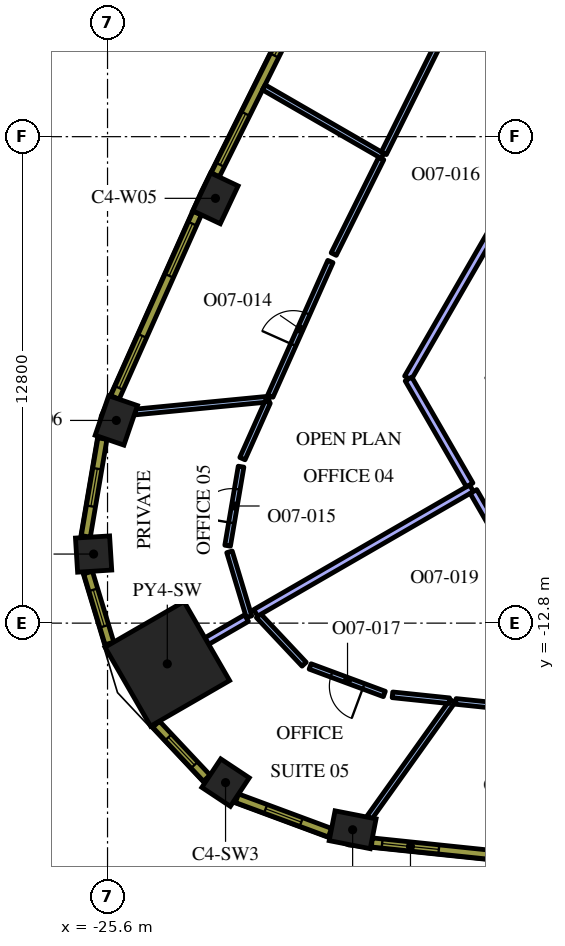
"""IFC4 building model, lengths in metres.
Left out: names, types, materials, properties, quantities, classifications, styles, units other than length and angle.
Written with IfcOpenShell. Run it as: python <this file> out.ifc"""

import sys

from ifc_helpers import new_model, si_unit, direction, frame, frame_2d, origin, origin_2d, place, context, subcontext, project, spatial, rectangle, extrude, element, fill, save


model = new_model("IFC4")
c1 = context("Model", 3, precision=1e-05, world=origin(), true_north=direction((0.0, 1.0)))
c2 = subcontext(c1, "Body", "Model", "MODEL_VIEW")
j1 = project(units=[si_unit("LENGTHUNIT", "METRE"), si_unit("PLANEANGLEUNIT", "RADIAN")], contexts=[c1])
p1 = place(None, origin())
s1 = spatial("IfcSite", under=j1, at=p1, CompositionType="ELEMENT")
p2 = place(p1, origin())
s2 = spatial("IfcBuilding", under=s1, at=p2, CompositionType="ELEMENT")
p3 = place(p2, frame((0.0, 0.0, 218.4)))
s3 = spatial("IfcBuildingStorey", under=s2, at=p3, CompositionType="ELEMENT", Elevation=218.4)
p4 = place(p3, frame((-24.027, -13.872, 0.0), z_axis=(0.0, 0.0, 1.0), x_axis=(-0.866025403784, -0.5, 0.0)))
e1 = element("IfcColumn", 1, at=p4, inside=s3, PredefinedType="COLUMN", context=c2, shape_type="SweptSolid", body=[
    extrude(rectangle(XDim=2.4, YDim=2.4, at=origin_2d()), origin(), (0.0, 0.0, 1.0), 4.2),
])
for number, where, z_axis, x_axis in (
    (2, (-19.15, -18.237, 0.0), (0.0, 0.0, 1.0), (0.981, -0.192, 0.0)),
    (3, (-22.76, -1.623, 0.0), (0.0, 0.0, 1.0), (-0.426, -0.905, 0.0)),
    (4, (-25.369, -7.466, 0.0), (0.0, 0.0, 1.0), (-0.324, -0.946, 0.0)),
):
    element("IfcColumn", number, at=place(p3, frame(where, z_axis=z_axis, x_axis=x_axis)), inside=s3, PredefinedType="COLUMN", context=c2, shape_type="SweptSolid", body=[
        extrude(rectangle(XDim=1.1, YDim=0.8, at=origin_2d()), origin(), (0.0, 0.0, 1.0), 4.2),
    ])
for number, where, z_axis, x_axis in (
    (5, (-25.967, -10.982, 0.0), (0.0, 0.0, 1.0), (0.062, -0.998, 0.0)),
    (6, (-22.494, -16.997, 0.0), (0.0, 0.0, 1.0), (0.833, -0.553, 0.0)),
):
    element("IfcColumn", number, at=place(p3, frame(where, z_axis=z_axis, x_axis=x_axis)), inside=s3, PredefinedType="COLUMN", context=c2, shape_type="SweptSolid", body=[
        extrude(rectangle(XDim=0.9, YDim=0.9, at=origin_2d()), origin(), (0.0, 0.0, 1.0), 4.2),
    ])
p5 = place(p3, frame((-18.363, -0.506, 0.0), z_axis=(0.0, 0.0, 1.0), x_axis=(-0.866048087663, 0.499960708312, 0.0)))
e7 = element("IfcWall", 7, at=p5, inside=s3, PredefinedType="PARTITIONING", context=c2, shape_type="SweptSolid", body=[
    extrude(rectangle(XDim=3.607, YDim=0.15, at=frame_2d((1.804, 0.0))), origin(), (0.0, 0.0, 1.0), 3.45),
])
p6 = place(p3, frame((-16.958, 2.321, 0.0), z_axis=(0.0, 0.0, 1.0), x_axis=(-0.445184199442, -0.895439014432, 0.0)))
e8 = element("IfcWall", 8, at=p6, inside=s3, PredefinedType="PARTITIONING", context=c2, shape_type="SweptSolid", body=[
    extrude(rectangle(XDim=3.082, YDim=0.15, at=frame_2d((1.541, 0.0))), origin(), (0.0, 0.0, 1.0), 3.45),
])
p7 = place(p3, frame((-21.351, -6.904, 0.0), z_axis=(0.0, 0.0, 1.0), x_axis=(-0.995356631468, -0.096255785242, 0.0)))
e9 = element("IfcWall", 9, at=p7, inside=s3, PredefinedType="PARTITIONING", context=c2, shape_type="SweptSolid", body=[
    extrude(rectangle(XDim=3.536, YDim=0.15, at=frame_2d((1.768, 0.0))), origin(), (0.0, 0.0, 1.0), 3.45),
])
p8 = place(p3, frame((-18.397, -0.573, 0.0), z_axis=(0.0, 0.0, 1.0), x_axis=(-0.445162501923, -0.89544980143, 0.0)))
e10 = element("IfcWall", 10, at=p8, inside=s3, PredefinedType="PARTITIONING", context=c2, shape_type="SweptSolid", body=[
    extrude(rectangle(XDim=2.811, YDim=0.15, at=frame_2d((1.405, 0.0))), origin(), (0.0, 0.0, 1.0), 3.45),
])
p9 = place(p3, frame((-21.316, -6.826, 0.0), z_axis=(0.0, 0.0, 1.0), x_axis=(0.407639588163, 0.913142905663, 0.0)))
e11 = element("IfcWall", 11, at=p9, inside=s3, PredefinedType="PARTITIONING", context=c2, shape_type="SweptSolid", body=[
    extrude(rectangle(XDim=3.877, YDim=0.15, at=frame_2d((1.938, 0.0))), origin(), (0.0, 0.0, 1.0), 3.45),
])
p10 = place(p9, frame((1.477, 0.0, 0.0)))
e12 = element("IfcOpeningElement", 12, at=p10, cuts=e11, PredefinedType="OPENING", context=c2, shape_type="SweptSolid", body=[
    extrude(rectangle(XDim=0.9, YDim=2.1, at=frame_2d((0.45, 1.05))), frame((0.0, 0.085, 0.0), z_axis=(0.0, -1.0, 0.0), x_axis=(1.0, 0.0, 0.0)), (0.0, 0.0, 1.0), 0.17),
])
p11 = place(p3, frame((-21.386, -6.983, 0.0), z_axis=(0.0, 0.0, 1.0), x_axis=(-0.407597309494, -0.91316177827, 0.0)))
e13 = element("IfcWall", 13, at=p11, inside=s3, PredefinedType="PARTITIONING", context=c2, shape_type="SweptSolid", body=[
    extrude(rectangle(XDim=1.63, YDim=0.15, at=frame_2d((0.815, 0.0))), origin(), (0.0, 0.0, 1.0), 3.45),
])
p12 = place(p3, frame((-22.44, -10.763, 0.0), z_axis=(0.0, 0.0, 1.0), x_axis=(0.167682096872, 0.985841120257, 0.0)))
e14 = element("IfcWall", 14, at=p12, inside=s3, PredefinedType="PARTITIONING", context=c2, shape_type="SweptSolid", body=[
    extrude(rectangle(XDim=2.11, YDim=0.15, at=frame_2d((1.055, 0.0))), origin(), (0.0, 0.0, 1.0), 3.45),
])
p13 = place(p12, frame((0.61, 0.0, 0.0)))
e15 = element("IfcOpeningElement", 15, at=p13, cuts=e14, PredefinedType="OPENING", context=c2, shape_type="SweptSolid", body=[
    extrude(rectangle(XDim=0.9, YDim=2.1, at=frame_2d((0.45, 1.05))), frame((0.0, 0.085, 0.0), z_axis=(0.0, -1.0, 0.0), x_axis=(1.0, 0.0, 0.0)), (0.0, 0.0, 1.0), 0.17),
])
p14 = place(p3, frame((-22.391, -10.924, 0.0), z_axis=(0.0, 0.0, 1.0), x_axis=(0.288642134652, -0.957437056993, 0.0)))
e16 = element("IfcWall", 16, at=p14, inside=s3, PredefinedType="PARTITIONING", context=c2, shape_type="SweptSolid", body=[
    extrude(rectangle(XDim=1.782, YDim=0.15, at=frame_2d((0.891, 0.0))), origin(), (0.0, 0.0, 1.0), 3.45),
])
p15 = place(p3, frame((-21.943, -12.669, 0.0), z_axis=(0.0, 0.0, 1.0), x_axis=(-0.866030586491, -0.499991023182, 0.0)))
e17 = element("IfcWall", 17, at=p15, inside=s3, PredefinedType="PARTITIONING", context=c2, shape_type="SweptSolid", body=[
    extrude(rectangle(XDim=1.207, YDim=0.2, at=frame_2d((0.603, 0.0))), origin(), (0.0, 0.0, 1.0), 3.45),
])
p16 = place(p3, frame((-16.021, -9.25, 0.0), z_axis=(0.0, 0.0, 1.0), x_axis=(-0.866021955858, -0.500005971936, 0.0)))
e18 = element("IfcWall", 18, at=p16, inside=s3, PredefinedType="PARTITIONING", context=c2, shape_type="SweptSolid", body=[
    extrude(rectangle(XDim=6.56, YDim=0.2, at=frame_2d((3.28, 0.0))), origin(), (0.0, 0.0, 1.0), 3.45),
])
p17 = place(p3, frame((-12.537, 2.585, 0.0), z_axis=(0.0, 0.0, 1.0), x_axis=(-0.500002393198, -0.866024022066, 0.0)))
e19 = element("IfcWall", 19, at=p17, inside=s3, PredefinedType="PARTITIONING", context=c2, shape_type="SweptSolid", body=[
    extrude(rectangle(XDim=10.317, YDim=0.2, at=frame_2d((5.159, 0.0))), origin(), (0.0, 0.0, 1.0), 3.45),
])
p18 = place(p17, frame((4.7, 0.0, 0.0)))
e20 = element("IfcOpeningElement", 20, at=p18, cuts=e19, PredefinedType="OPENING", context=c2, shape_type="SweptSolid", body=[
    extrude(rectangle(XDim=1.0, YDim=2.1, at=frame_2d((0.5, 1.05))), frame((0.0, 0.11, 0.0), z_axis=(0.0, -1.0, 0.0), x_axis=(1.0, 0.0, 0.0)), (0.0, 0.0, 1.0), 0.22),
])
p19 = place(p3, frame((-17.681, -6.376, 0.0), z_axis=(0.0, 0.0, 1.0), x_axis=(0.500022299258, -0.866012528919, 0.0)))
e21 = element("IfcWall", 21, at=p19, inside=s3, PredefinedType="PARTITIONING", context=c2, shape_type="SweptSolid", body=[
    extrude(rectangle(XDim=3.219, YDim=0.2, at=frame_2d((1.609, 0.0))), origin(), (0.0, 0.0, 1.0), 3.45),
])
p20 = place(p3, frame((-16.521, -14.851, 0.0), z_axis=(0.0, 0.0, 1.0), x_axis=(-0.58104805465, -0.813869251285, 0.0)))
e22 = element("IfcWall", 22, at=p20, inside=s3, PredefinedType="PARTITIONING", context=c2, shape_type="SweptSolid", body=[
    extrude(rectangle(XDim=3.766, YDim=0.15, at=frame_2d((1.883, 0.0))), origin(), (0.0, 0.0, 1.0), 3.45),
])
p21 = place(p3, frame((-21.628, -12.603, 0.0), z_axis=(0.0, 0.0, 1.0), x_axis=(0.684778496912, -0.728751267695, 0.0)))
e23 = element("IfcWall", 23, at=p21, inside=s3, PredefinedType="PARTITIONING", context=c2, shape_type="SweptSolid", body=[
    extrude(rectangle(XDim=1.754, YDim=0.15, at=frame_2d((0.877, 0.0))), origin(), (0.0, 0.0, 1.0), 3.45),
])
p22 = place(p3, frame((-18.316, -14.664, 0.0), z_axis=(0.0, 0.0, 1.0), x_axis=(-0.937594570401, 0.347730386297, 0.0)))
e24 = element("IfcWall", 24, at=p22, inside=s3, PredefinedType="PARTITIONING", context=c2, shape_type="SweptSolid", body=[
    extrude(rectangle(XDim=2.083, YDim=0.15, at=frame_2d((1.042, 0.0))), origin(), (0.0, 0.0, 1.0), 3.45),
])
p23 = place(p22, frame((0.583, 0.0, 0.0)))
e25 = element("IfcOpeningElement", 25, at=p23, cuts=e24, PredefinedType="OPENING", context=c2, shape_type="SweptSolid", body=[
    extrude(rectangle(XDim=0.9, YDim=2.1, at=frame_2d((0.45, 1.05))), frame((0.0, 0.085, 0.0), z_axis=(0.0, -1.0, 0.0), x_axis=(1.0, 0.0, 0.0)), (0.0, 0.0, 1.0), 0.17),
])
p24 = place(p3, frame((-18.103, -14.686, 0.0), z_axis=(0.0, 0.0, 1.0), x_axis=(0.994622241781, -0.103569281909, 0.0)))
e26 = element("IfcWall", 26, at=p24, inside=s3, PredefinedType="PARTITIONING", context=c2, shape_type="SweptSolid", body=[
    extrude(rectangle(XDim=1.504, YDim=0.15, at=frame_2d((0.752, 0.0))), origin(), (0.0, 0.0, 1.0), 3.45),
])
p25 = place(p3, frame((-12.823, -15.236, 0.0), z_axis=(0.0, 0.0, 1.0), x_axis=(-0.994621582944, 0.10357560882, 0.0)))
e27 = element("IfcWall", 27, at=p25, inside=s3, PredefinedType="PARTITIONING", context=c2, shape_type="SweptSolid", body=[
    extrude(rectangle(XDim=3.632, YDim=0.15, at=frame_2d((1.816, 0.0))), origin(), (0.0, 0.0, 1.0), 3.45),
])
p26 = place(p25, frame((1.332, 0.0, 0.0)))
e28 = element("IfcOpeningElement", 28, at=p26, cuts=e27, PredefinedType="OPENING", context=c2, shape_type="SweptSolid", body=[
    extrude(rectangle(XDim=0.9, YDim=2.1, at=frame_2d((0.45, 1.05))), frame((0.0, 0.085, 0.0), z_axis=(0.0, -1.0, 0.0), x_axis=(1.0, 0.0, 0.0)), (0.0, 0.0, 1.0), 0.17),
])
p27 = place(p3, frame((-15.971, -9.337, 0.0), z_axis=(0.0, 0.0, 1.0), x_axis=(0.500010870188, -0.866019127788, 0.0)))
e29 = element("IfcWall", 29, at=p27, inside=s3, PredefinedType="PARTITIONING", context=c2, shape_type="SweptSolid", body=[
    extrude(rectangle(XDim=3.249, YDim=0.2, at=frame_2d((1.624, 0.0))), origin(), (0.0, 0.0, 1.0), 3.45),
])
p28 = place(p27, frame((1.1, 0.0, 0.0)))
e30 = element("IfcOpeningElement", 30, at=p28, cuts=e29, PredefinedType="OPENING", context=c2, shape_type="SweptSolid", body=[
    extrude(rectangle(XDim=1.0, YDim=2.1, at=frame_2d((0.5, 1.05))), frame((0.0, 0.11, 0.0), z_axis=(0.0, -1.0, 0.0), x_axis=(1.0, 0.0, 0.0)), (0.0, 0.0, 1.0), 0.22),
])
p29 = place(p3, frame((-18.644, -18.571, 0.0), z_axis=(0.0, 0.0, 1.0), x_axis=(0.994621961215, -0.103571976272, 0.0)))
e31 = element("IfcWall", 31, at=p29, inside=s3, PredefinedType="SOLIDWALL", context=c2, shape_type="SweptSolid", body=[
    extrude(rectangle(XDim=5.311, YDim=0.24, at=frame_2d((2.655, 0.0))), origin(), (0.0, 0.0, 1.0), 3.95),
])
p30 = place(p29, frame((0.271, 0.0, 0.9)))
e32 = element("IfcOpeningElement", 32, at=p30, cuts=e31, PredefinedType="OPENING", context=c2, shape_type="SweptSolid", body=[
    extrude(rectangle(XDim=1.5, YDim=2.55, at=frame_2d((0.75, 1.275))), frame((0.0, 0.13, 0.0), z_axis=(0.0, -1.0, 0.0), x_axis=(1.0, 0.0, 0.0)), (0.0, 0.0, 1.0), 0.26),
])
p31 = place(p29, frame((3.504, 0.0, 0.9)))
e33 = element("IfcOpeningElement", 33, at=p31, cuts=e31, PredefinedType="OPENING", context=c2, shape_type="SweptSolid", body=[
    extrude(rectangle(XDim=1.5, YDim=2.55, at=frame_2d((0.75, 1.275))), frame((0.0, 0.13, 0.0), z_axis=(0.0, -1.0, 0.0), x_axis=(1.0, 0.0, 0.0)), (0.0, 0.0, 1.0), 0.26),
])
p32 = place(p3, frame((-20.407, 3.74, 0.0), z_axis=(0.0, 0.0, 1.0), x_axis=(-0.445129582031, -0.895466166419, 0.0)))
e34 = element("IfcWall", 34, at=p32, inside=s3, PredefinedType="SOLIDWALL", context=c2, shape_type="SweptSolid", body=[
    extrude(rectangle(XDim=5.298, YDim=0.24, at=frame_2d((2.649, 0.0))), origin(), (0.0, 0.0, 1.0), 3.95),
])
p33 = place(p32, frame((0.295, 0.0, 0.9)))
e35 = element("IfcOpeningElement", 35, at=p33, cuts=e34, PredefinedType="OPENING", context=c2, shape_type="SweptSolid", body=[
    extrude(rectangle(XDim=1.5, YDim=2.55, at=frame_2d((0.75, 1.275))), frame((0.0, 0.13, 0.0), z_axis=(0.0, -1.0, 0.0), x_axis=(1.0, 0.0, 0.0)), (0.0, 0.0, 1.0), 0.26),
])
p34 = place(p32, frame((3.504, 0.0, 0.9)))
e36 = element("IfcOpeningElement", 36, at=p34, cuts=e34, PredefinedType="OPENING", context=c2, shape_type="SweptSolid", body=[
    extrude(rectangle(XDim=1.5, YDim=2.55, at=frame_2d((0.75, 1.275))), frame((0.0, 0.13, 0.0), z_axis=(0.0, -1.0, 0.0), x_axis=(1.0, 0.0, 0.0)), (0.0, 0.0, 1.0), 0.26),
])
p35 = place(p3, frame((-23.24, -2.011, 0.0), z_axis=(0.0, 0.0, 1.0), x_axis=(-0.407579651789, -0.913169659728, 0.0)))
e37 = element("IfcWall", 37, at=p35, inside=s3, PredefinedType="SOLIDWALL", context=c2, shape_type="SweptSolid", body=[
    extrude(rectangle(XDim=5.311, YDim=0.24, at=frame_2d((2.655, 0.0))), origin(), (0.0, 0.0, 1.0), 3.95),
])
p36 = place(p35, frame((0.306, 0.0, 0.9)))
e38 = element("IfcOpeningElement", 38, at=p36, cuts=e37, PredefinedType="OPENING", context=c2, shape_type="SweptSolid", body=[
    extrude(rectangle(XDim=1.5, YDim=2.55, at=frame_2d((0.75, 1.275))), frame((0.0, 0.13, 0.0), z_axis=(0.0, -1.0, 0.0), x_axis=(1.0, 0.0, 0.0)), (0.0, 0.0, 1.0), 0.26),
])
p37 = place(p35, frame((3.539, 0.0, 0.9)))
e39 = element("IfcOpeningElement", 39, at=p37, cuts=e37, PredefinedType="OPENING", context=c2, shape_type="SweptSolid", body=[
    extrude(rectangle(XDim=1.5, YDim=2.55, at=frame_2d((0.75, 1.275))), frame((0.0, 0.13, 0.0), z_axis=(0.0, -1.0, 0.0), x_axis=(1.0, 0.0, 0.0)), (0.0, 0.0, 1.0), 0.26),
])
p38 = place(p3, frame((-25.734, -7.945, 0.0), z_axis=(0.0, 0.0, 1.0), x_axis=(-0.167660055546, -0.985844869021, 0.0)))
e40 = element("IfcWall", 40, at=p38, inside=s3, PredefinedType="SOLIDWALL", context=c2, shape_type="SweptSolid", body=[
    extrude(rectangle(XDim=2.609, YDim=0.24, at=frame_2d((1.305, 0.0))), origin(), (0.0, 0.0, 1.0), 3.95),
])
p39 = place(p38, frame((0.805, 0.0, 0.9)))
e41 = element("IfcOpeningElement", 41, at=p39, cuts=e40, PredefinedType="OPENING", context=c2, shape_type="SweptSolid", body=[
    extrude(rectangle(XDim=1.0, YDim=2.55, at=frame_2d((0.5, 1.275))), frame((0.0, 0.13, 0.0), z_axis=(0.0, -1.0, 0.0), x_axis=(1.0, 0.0, 0.0)), (0.0, 0.0, 1.0), 0.26),
])
p40 = place(p3, frame((-26.112, -11.469, 0.0), z_axis=(0.0, 0.0, 1.0), x_axis=(0.288727209095, -0.957411405159, 0.0)))
e42 = element("IfcWall", 42, at=p40, inside=s3, PredefinedType="SOLIDWALL", context=c2, shape_type="SweptSolid", body=[
    extrude(rectangle(XDim=1.948, YDim=0.24, at=frame_2d((0.974, 0.0))), origin(), (0.0, 0.0, 1.0), 3.95),
])
p41 = place(p40, frame((0.474, 0.0, 0.9)))
e43 = element("IfcOpeningElement", 43, at=p41, cuts=e42, PredefinedType="OPENING", context=c2, shape_type="SweptSolid", body=[
    extrude(rectangle(XDim=1.0, YDim=2.55, at=frame_2d((0.5, 1.275))), frame((0.0, 0.13, 0.0), z_axis=(0.0, -1.0, 0.0), x_axis=(1.0, 0.0, 0.0)), (0.0, 0.0, 1.0), 0.26),
])
p42 = place(p3, frame((-24.323, -15.459, 0.0), z_axis=(0.0, 0.0, 1.0), x_axis=(0.684770274166, -0.728758994194, 0.0)))
e44 = element("IfcWall", 44, at=p42, inside=s3, PredefinedType="SOLIDWALL", context=c2, shape_type="SweptSolid", body=[
    extrude(rectangle(XDim=1.948, YDim=0.24, at=frame_2d((0.974, 0.0))), origin(), (0.0, 0.0, 1.0), 3.95),
])
p43 = place(p42, frame((0.474, 0.0, 0.9)))
e45 = element("IfcOpeningElement", 45, at=p43, cuts=e44, PredefinedType="OPENING", context=c2, shape_type="SweptSolid", body=[
    extrude(rectangle(XDim=1.0, YDim=2.55, at=frame_2d((0.5, 1.275))), frame((0.0, 0.13, 0.0), z_axis=(0.0, -1.0, 0.0), x_axis=(1.0, 0.0, 0.0)), (0.0, 0.0, 1.0), 0.26),
])
p44 = place(p3, frame((-22.194, -17.406, 0.0), z_axis=(0.0, 0.0, 1.0), x_axis=(0.937569171184, -0.347798863203, 0.0)))
e46 = element("IfcWall", 46, at=p44, inside=s3, PredefinedType="SOLIDWALL", context=c2, shape_type="SweptSolid", body=[
    extrude(rectangle(XDim=2.609, YDim=0.24, at=frame_2d((1.305, 0.0))), origin(), (0.0, 0.0, 1.0), 3.95),
])
p45 = place(p44, frame((0.805, 0.0, 0.9)))
e47 = element("IfcOpeningElement", 47, at=p45, cuts=e46, PredefinedType="OPENING", context=c2, shape_type="SweptSolid", body=[
    extrude(rectangle(XDim=1.0, YDim=2.55, at=frame_2d((0.5, 1.275))), frame((0.0, 0.13, 0.0), z_axis=(0.0, -1.0, 0.0), x_axis=(1.0, 0.0, 0.0)), (0.0, 0.0, 1.0), 0.26),
])
p46 = place(p10, origin())
e48 = element("IfcDoor", 48, at=p46, inside=s3, OperationType="SINGLE_SWING_LEFT", PredefinedType="DOOR", context=c2, shape_type="SweptSolid", body=[
    extrude(rectangle(XDim=0.9, YDim=2.1, at=frame_2d((0.45, 1.05))), frame((0.0, 0.025, 0.0), z_axis=(0.0, -1.0, 0.0), x_axis=(1.0, 0.0, 0.0)), (0.0, 0.0, 1.0), 0.05),
])
fill(e12, e48)
p47 = place(p13, origin())
e49 = element("IfcDoor", 49, at=p47, inside=s3, OperationType="SINGLE_SWING_RIGHT", PredefinedType="DOOR", context=c2, shape_type="SweptSolid", body=[
    extrude(rectangle(XDim=0.9, YDim=2.1, at=frame_2d((0.45, 1.05))), frame((0.0, 0.025, 0.0), z_axis=(0.0, -1.0, 0.0), x_axis=(1.0, 0.0, 0.0)), (0.0, 0.0, 1.0), 0.05),
])
fill(e15, e49)
p48 = place(p23, origin())
e50 = element("IfcDoor", 50, at=p48, inside=s3, OperationType="SINGLE_SWING_LEFT", PredefinedType="DOOR", context=c2, shape_type="SweptSolid", body=[
    extrude(rectangle(XDim=0.9, YDim=2.1, at=frame_2d((0.45, 1.05))), frame((0.0, 0.025, 0.0), z_axis=(0.0, -1.0, 0.0), x_axis=(1.0, 0.0, 0.0)), (0.0, 0.0, 1.0), 0.05),
])
fill(e25, e50)
p49 = place(p30, origin())
e51 = element("IfcWindow", 51, at=p49, inside=s3, PartitioningType="SINGLE_PANEL", PredefinedType="WINDOW", context=c2, shape_type="SweptSolid", body=[
    extrude(rectangle(XDim=1.5, YDim=2.55, at=frame_2d((0.75, 1.275))), frame((0.0, 0.04, 0.0), z_axis=(0.0, -1.0, 0.0), x_axis=(1.0, 0.0, 0.0)), (0.0, 0.0, 1.0), 0.06),
])
fill(e32, e51)
p50 = place(p33, origin())
e52 = element("IfcWindow", 52, at=p50, inside=s3, PartitioningType="SINGLE_PANEL", PredefinedType="WINDOW", context=c2, shape_type="SweptSolid", body=[
    extrude(rectangle(XDim=1.5, YDim=2.55, at=frame_2d((0.75, 1.275))), frame((0.0, 0.04, 0.0), z_axis=(0.0, -1.0, 0.0), x_axis=(1.0, 0.0, 0.0)), (0.0, 0.0, 1.0), 0.06),
])
fill(e35, e52)
p51 = place(p34, origin())
e53 = element("IfcWindow", 53, at=p51, inside=s3, PartitioningType="SINGLE_PANEL", PredefinedType="WINDOW", context=c2, shape_type="SweptSolid", body=[
    extrude(rectangle(XDim=1.5, YDim=2.55, at=frame_2d((0.75, 1.275))), frame((0.0, 0.04, 0.0), z_axis=(0.0, -1.0, 0.0), x_axis=(1.0, 0.0, 0.0)), (0.0, 0.0, 1.0), 0.06),
])
fill(e36, e53)
p52 = place(p36, origin())
e54 = element("IfcWindow", 54, at=p52, inside=s3, PartitioningType="SINGLE_PANEL", PredefinedType="WINDOW", context=c2, shape_type="SweptSolid", body=[
    extrude(rectangle(XDim=1.5, YDim=2.55, at=frame_2d((0.75, 1.275))), frame((0.0, 0.04, 0.0), z_axis=(0.0, -1.0, 0.0), x_axis=(1.0, 0.0, 0.0)), (0.0, 0.0, 1.0), 0.06),
])
fill(e38, e54)
p53 = place(p37, origin())
e55 = element("IfcWindow", 55, at=p53, inside=s3, PartitioningType="SINGLE_PANEL", PredefinedType="WINDOW", context=c2, shape_type="SweptSolid", body=[
    extrude(rectangle(XDim=1.5, YDim=2.55, at=frame_2d((0.75, 1.275))), frame((0.0, 0.04, 0.0), z_axis=(0.0, -1.0, 0.0), x_axis=(1.0, 0.0, 0.0)), (0.0, 0.0, 1.0), 0.06),
])
fill(e39, e55)
p54 = place(p39, origin())
e56 = element("IfcWindow", 56, at=p54, inside=s3, PartitioningType="SINGLE_PANEL", PredefinedType="WINDOW", context=c2, shape_type="SweptSolid", body=[
    extrude(rectangle(XDim=1.0, YDim=2.55, at=frame_2d((0.5, 1.275))), frame((0.0, 0.04, 0.0), z_axis=(0.0, -1.0, 0.0), x_axis=(1.0, 0.0, 0.0)), (0.0, 0.0, 1.0), 0.06),
])
fill(e41, e56)
p55 = place(p41, origin())
e57 = element("IfcWindow", 57, at=p55, inside=s3, PartitioningType="SINGLE_PANEL", PredefinedType="WINDOW", context=c2, shape_type="SweptSolid", body=[
    extrude(rectangle(XDim=1.0, YDim=2.55, at=frame_2d((0.5, 1.275))), frame((0.0, 0.04, 0.0), z_axis=(0.0, -1.0, 0.0), x_axis=(1.0, 0.0, 0.0)), (0.0, 0.0, 1.0), 0.06),
])
fill(e43, e57)
p56 = place(p43, origin())
e58 = element("IfcWindow", 58, at=p56, inside=s3, PartitioningType="SINGLE_PANEL", PredefinedType="WINDOW", context=c2, shape_type="SweptSolid", body=[
    extrude(rectangle(XDim=1.0, YDim=2.55, at=frame_2d((0.5, 1.275))), frame((0.0, 0.04, 0.0), z_axis=(0.0, -1.0, 0.0), x_axis=(1.0, 0.0, 0.0)), (0.0, 0.0, 1.0), 0.06),
])
fill(e45, e58)
p57 = place(p45, origin())
e59 = element("IfcWindow", 59, at=p57, inside=s3, PartitioningType="SINGLE_PANEL", PredefinedType="WINDOW", context=c2, shape_type="SweptSolid", body=[
    extrude(rectangle(XDim=1.0, YDim=2.55, at=frame_2d((0.5, 1.275))), frame((0.0, 0.04, 0.0), z_axis=(0.0, -1.0, 0.0), x_axis=(1.0, 0.0, 0.0)), (0.0, 0.0, 1.0), 0.06),
])
fill(e47, e59)
save(model, sys.argv[1])
